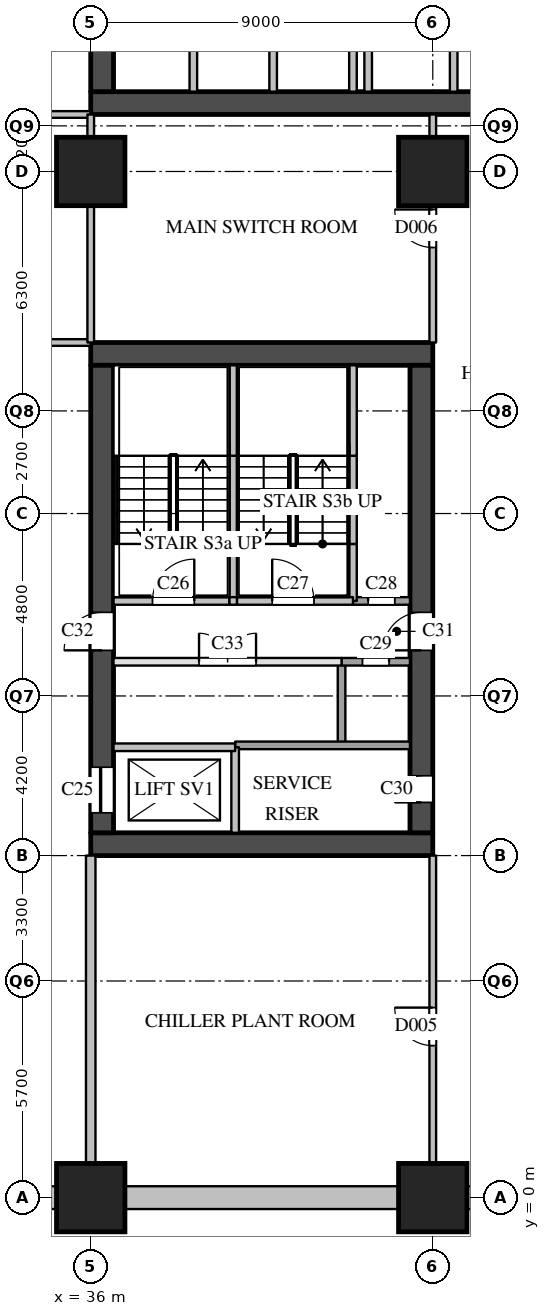
"""IFC4 building model, lengths in metres.
Left out: names, types, materials, properties, quantities, classifications, styles, units other than length and angle.
Written with IfcOpenShell. Run it as: python <this file> out.ifc"""

import sys

from ifc_helpers import new_model, si_unit, direction, frame, frame_2d, origin, origin_2d, place, context, subcontext, project, spatial, rectangle, extrude, element, fill, save


model = new_model("IFC4")
c1 = context("Model", 3, precision=1e-05, world=origin(), true_north=direction((0.0, 1.0)))
c2 = subcontext(c1, "Body", "Model", "MODEL_VIEW")
j1 = project(units=[si_unit("LENGTHUNIT", "METRE"), si_unit("PLANEANGLEUNIT", "RADIAN")], contexts=[c1])
p1 = place(None, origin())
s1 = spatial("IfcSite", under=j1, at=p1, CompositionType="ELEMENT")
p2 = place(p1, origin())
s2 = spatial("IfcBuilding", under=s1, at=p2, CompositionType="ELEMENT")
p3 = place(p2, frame((0.0, 0.0, -6.0)))
s3 = spatial("IfcBuildingStorey", under=s2, at=p3, CompositionType="ELEMENT", Elevation=-6.0)
for number, where, z_axis, x_axis in (
    (1, (36.0, 0.0, 0.0), (0.0, 0.0, 1.0), (1.0, 0.0, 0.0)),
    (2, (36.0, 27.0, 0.0), (0.0, 0.0, 1.0), (1.0, 0.0, 0.0)),
    (3, (45.0, 0.0, 0.0), (0.0, 0.0, 1.0), (1.0, 0.0, 0.0)),
    (4, (45.0, 27.0, 0.0), (0.0, 0.0, 1.0), (1.0, 0.0, 0.0)),
):
    element("IfcColumn", number, at=place(p3, frame(where, z_axis=z_axis, x_axis=x_axis)), inside=s3, PredefinedType="COLUMN", context=c2, shape_type="SweptSolid", body=[
        extrude(rectangle(XDim=1.8, YDim=1.8, at=origin_2d()), origin(), (0.0, 0.0, 1.0), 6.0),
    ])
for number, where, z_axis, x_axis in (
    (5, (27.9, 0.0, 0.0), (0.0, 0.0, 1.0), (1.0, 0.0, 0.0)),
    (6, (36.9, 0.0, 0.0), (0.0, 0.0, 1.0), (1.0, 0.0, 0.0)),
):
    element("IfcWall", number, at=place(p3, frame(where, z_axis=z_axis, x_axis=x_axis)), inside=s3, PredefinedType="SOLIDWALL", context=c2, shape_type="SweptSolid", body=[
        extrude(rectangle(XDim=7.2, YDim=0.6, at=frame_2d((3.6, 0.0))), origin(), (0.0, 0.0, 1.0), 5.59),
    ])
p4 = place(p3, frame((45.9, 0.0, 0.0), z_axis=(0.0, 0.0, 1.0), x_axis=(1.0, 0.0, 0.0)))
e7 = element("IfcWall", 7, at=p4, inside=s3, PredefinedType="SOLIDWALL", context=c2, shape_type="SweptSolid", body=[
    extrude(rectangle(XDim=3.6, YDim=0.6, at=frame_2d((1.8, 0.0))), origin(), (0.0, 0.0, 1.0), 5.59),
])
p5 = place(p3, frame((36.0, 28.8, 0.0), z_axis=(0.0, 0.0, 1.0), x_axis=(1.0, 0.0, 0.0)))
e8 = element("IfcWall", 8, at=p5, inside=s3, PredefinedType="SHEAR", context=c2, shape_type="SweptSolid", body=[
    extrude(rectangle(XDim=12.4, YDim=0.6, at=frame_2d((6.2, 0.0))), origin(), (0.0, 0.0, 1.0), 5.59),
])
p6 = place(p3, frame((36.3, 29.1, 0.0), z_axis=(0.0, 0.0, 1.0), x_axis=(0.0, 1.0, 0.0)))
e9 = element("IfcWall", 9, at=p6, inside=s3, PredefinedType="SHEAR", context=c2, shape_type="SweptSolid", body=[
    extrude(rectangle(XDim=20.3, YDim=0.6, at=frame_2d((10.15, 0.0))), origin(), (0.0, 0.0, 1.0), 5.59),
])
p7 = place(p6, frame((16.4, 0.0, 0.0)))
e10 = element("IfcOpeningElement", 10, at=p7, cuts=e9, PredefinedType="OPENING", context=c2, shape_type="SweptSolid", body=[
    extrude(rectangle(XDim=1.0, YDim=2.1, at=frame_2d((0.5, 1.05))), frame((0.0, 0.31, 0.0), z_axis=(0.0, -1.0, 0.0), x_axis=(1.0, 0.0, 0.0)), (0.0, 0.0, 1.0), 0.62),
])
for number, where, z_axis, x_axis in (
    (11, (38.7, 29.1, 0.0), (0.0, 0.0, 1.0), (0.0, 1.0, 0.0)),
    (12, (40.8, 29.1, 0.0), (0.0, 0.0, 1.0), (0.0, 1.0, 0.0)),
    (13, (42.9, 29.1, 0.0), (0.0, 0.0, 1.0), (0.0, 1.0, 0.0)),
    (14, (43.3, 29.1, 0.0), (0.0, 0.0, 1.0), (0.0, 1.0, 0.0)),
    (15, (45.55, 29.1, 0.0), (0.0, 0.0, 1.0), (0.0, 1.0, 0.0)),
):
    element("IfcWall", number, at=place(p3, frame(where, z_axis=z_axis, x_axis=x_axis)), inside=s3, PredefinedType="SOLIDWALL", context=c2, shape_type="SweptSolid", body=[
        extrude(rectangle(XDim=3.2, YDim=0.2, at=frame_2d((1.6, 0.0))), origin(), (0.0, 0.0, 1.0), 5.59),
    ])
for number, where, z_axis, x_axis in (
    (16, (36.0, 9.3, 0.0), (0.0, 0.0, 1.0), (1.0, 0.0, 0.0)),
    (17, (36.0, 22.2, 0.0), (0.0, 0.0, 1.0), (1.0, 0.0, 0.0)),
):
    element("IfcWall", number, at=place(p3, frame(where, z_axis=z_axis, x_axis=x_axis)), inside=s3, PredefinedType="SHEAR", context=c2, shape_type="SweptSolid", body=[
        extrude(rectangle(XDim=9.0, YDim=0.6, at=frame_2d((4.5, 0.0))), origin(), (0.0, 0.0, 1.0), 5.59),
    ])
p8 = place(p3, frame((36.3, 9.6, 0.0), z_axis=(0.0, 0.0, 1.0), x_axis=(0.0, 1.0, 0.0)))
e18 = element("IfcWall", 18, at=p8, inside=s3, PredefinedType="SHEAR", context=c2, shape_type="SweptSolid", body=[
    extrude(rectangle(XDim=12.3, YDim=0.6, at=frame_2d((6.15, 0.0))), origin(), (0.0, 0.0, 1.0), 5.59),
])
p9 = place(p8, frame((0.525, 0.0, 0.0)))
e19 = element("IfcOpeningElement", 19, at=p9, cuts=e18, PredefinedType="OPENING", context=c2, shape_type="SweptSolid", body=[
    extrude(rectangle(XDim=1.2, YDim=2.1, at=frame_2d((0.6, 1.05))), frame((0.0, 0.31, 0.0), z_axis=(0.0, -1.0, 0.0), x_axis=(1.0, 0.0, 0.0)), (0.0, 0.0, 1.0), 0.62),
])
p10 = place(p8, frame((4.8, 0.0, 0.0)))
e20 = element("IfcOpeningElement", 20, at=p10, cuts=e18, PredefinedType="OPENING", context=c2, shape_type="SweptSolid", body=[
    extrude(rectangle(XDim=1.0, YDim=2.1, at=frame_2d((0.5, 1.05))), frame((0.0, 0.31, 0.0), z_axis=(0.0, -1.0, 0.0), x_axis=(1.0, 0.0, 0.0)), (0.0, 0.0, 1.0), 0.62),
])
p11 = place(p3, frame((44.7, 9.6, 0.0), z_axis=(0.0, 0.0, 1.0), x_axis=(0.0, 1.0, 0.0)))
e21 = element("IfcWall", 21, at=p11, inside=s3, PredefinedType="SHEAR", context=c2, shape_type="SweptSolid", body=[
    extrude(rectangle(XDim=12.3, YDim=0.6, at=frame_2d((6.15, 0.0))), origin(), (0.0, 0.0, 1.0), 5.59),
])
p12 = place(p11, frame((0.8, 0.0, 0.0)))
e22 = element("IfcOpeningElement", 22, at=p12, cuts=e21, PredefinedType="OPENING", context=c2, shape_type="SweptSolid", body=[
    extrude(rectangle(XDim=0.7, YDim=2.1, at=frame_2d((0.35, 1.05))), frame((0.0, 0.31, 0.0), z_axis=(0.0, -1.0, 0.0), x_axis=(1.0, 0.0, 0.0)), (0.0, 0.0, 1.0), 0.62),
])
p13 = place(p11, frame((4.8, 0.0, 0.0)))
e23 = element("IfcOpeningElement", 23, at=p13, cuts=e21, PredefinedType="OPENING", context=c2, shape_type="SweptSolid", body=[
    extrude(rectangle(XDim=1.0, YDim=2.1, at=frame_2d((0.5, 1.05))), frame((0.0, 0.31, 0.0), z_axis=(0.0, -1.0, 0.0), x_axis=(1.0, 0.0, 0.0)), (0.0, 0.0, 1.0), 0.62),
])
p14 = place(p3, frame((39.75, 15.7, 0.0), z_axis=(0.0, 0.0, 1.0), x_axis=(0.0, 1.0, 0.0)))
e24 = element("IfcWall", 24, at=p14, inside=s3, PredefinedType="SOLIDWALL", context=c2, shape_type="SweptSolid", body=[
    extrude(rectangle(XDim=1.5, YDim=0.2, at=frame_2d((0.75, 0.0))), origin(), (0.0, 0.0, 1.0), 5.59),
])
p15 = place(p3, frame((39.75, 17.2, 0.0), z_axis=(0.0, 0.0, 1.0), x_axis=(0.0, 1.0, 0.0)))
e25 = element("IfcWall", 25, at=p15, inside=s3, PredefinedType="SOLIDWALL", context=c2, shape_type="SweptSolid", body=[
    extrude(rectangle(XDim=2.32, YDim=0.2, at=frame_2d((1.16, 0.0))), origin(), (0.0, 0.0, 1.0), 5.59),
])
p16 = place(p3, frame((39.75, 19.52, 0.0), z_axis=(0.0, 0.0, 1.0), x_axis=(0.0, 1.0, 0.0)))
e26 = element("IfcWall", 26, at=p16, inside=s3, PredefinedType="SOLIDWALL", context=c2, shape_type="SweptSolid", body=[
    extrude(rectangle(XDim=2.38, YDim=0.2, at=frame_2d((1.19, 0.0))), origin(), (0.0, 0.0, 1.0), 5.59),
])
p17 = place(p3, frame((39.8, 9.6, 0.0), z_axis=(0.0, 0.0, 1.0), x_axis=(0.0, 1.0, 0.0)))
e27 = element("IfcWall", 27, at=p17, inside=s3, PredefinedType="SOLIDWALL", context=c2, shape_type="SweptSolid", body=[
    extrude(rectangle(XDim=2.25, YDim=0.2, at=frame_2d((1.125, 0.0))), origin(), (0.0, 0.0, 1.0), 5.59),
])
p18 = place(p3, frame((39.8, 11.85, 0.0), z_axis=(0.0, 0.0, 1.0), x_axis=(0.0, 1.0, 0.0)))
e28 = element("IfcWall", 28, at=p18, inside=s3, PredefinedType="SOLIDWALL", context=c2, shape_type="SweptSolid", body=[
    extrude(rectangle(XDim=0.05, YDim=0.2, at=frame_2d((0.025, 0.0))), origin(), (0.0, 0.0, 1.0), 5.59),
])
p19 = place(p3, frame((42.6, 11.9, 0.0), z_axis=(0.0, 0.0, 1.0), x_axis=(0.0, 1.0, 0.0)))
e29 = element("IfcWall", 29, at=p19, inside=s3, PredefinedType="SOLIDWALL", context=c2, shape_type="SweptSolid", body=[
    extrude(rectangle(XDim=2.2, YDim=0.2, at=frame_2d((1.1, 0.0))), origin(), (0.0, 0.0, 1.0), 5.59),
])
p20 = place(p3, frame((42.9, 15.7, 0.0), z_axis=(0.0, 0.0, 1.0), x_axis=(0.0, 1.0, 0.0)))
e30 = element("IfcWall", 30, at=p20, inside=s3, PredefinedType="SOLIDWALL", context=c2, shape_type="SweptSolid", body=[
    extrude(rectangle(XDim=1.5, YDim=0.2, at=frame_2d((0.75, 0.0))), origin(), (0.0, 0.0, 1.0), 5.59),
])
p21 = place(p3, frame((42.9, 17.2, 0.0), z_axis=(0.0, 0.0, 1.0), x_axis=(0.0, 1.0, 0.0)))
e31 = element("IfcWall", 31, at=p21, inside=s3, PredefinedType="SOLIDWALL", context=c2, shape_type="SweptSolid", body=[
    extrude(rectangle(XDim=2.32, YDim=0.2, at=frame_2d((1.16, 0.0))), origin(), (0.0, 0.0, 1.0), 5.59),
])
p22 = place(p3, frame((42.9, 19.52, 0.0), z_axis=(0.0, 0.0, 1.0), x_axis=(0.0, 1.0, 0.0)))
e32 = element("IfcWall", 32, at=p22, inside=s3, PredefinedType="SOLIDWALL", context=c2, shape_type="SweptSolid", body=[
    extrude(rectangle(XDim=2.38, YDim=0.2, at=frame_2d((1.19, 0.0))), origin(), (0.0, 0.0, 1.0), 5.59),
])
p23 = place(p3, frame((36.6, 11.85, 0.0), z_axis=(0.0, 0.0, 1.0), x_axis=(1.0, 0.0, 0.0)))
e33 = element("IfcWall", 33, at=p23, inside=s3, PredefinedType="SOLIDWALL", context=c2, shape_type="SweptSolid", body=[
    extrude(rectangle(XDim=3.2, YDim=0.2, at=frame_2d((1.6, 0.0))), origin(), (0.0, 0.0, 1.0), 5.59),
])
p24 = place(p3, frame((39.8, 11.9, 0.0), z_axis=(0.0, 0.0, 1.0), x_axis=(1.0, 0.0, 0.0)))
e34 = element("IfcWall", 34, at=p24, inside=s3, PredefinedType="SOLIDWALL", context=c2, shape_type="SweptSolid", body=[
    extrude(rectangle(XDim=4.6, YDim=0.2, at=frame_2d((2.3, 0.0))), origin(), (0.0, 0.0, 1.0), 5.59),
])
p25 = place(p3, frame((36.6, 14.1, 0.0), z_axis=(0.0, 0.0, 1.0), x_axis=(1.0, 0.0, 0.0)))
e35 = element("IfcWall", 35, at=p25, inside=s3, PredefinedType="PARTITIONING", context=c2, shape_type="SweptSolid", body=[
    extrude(rectangle(XDim=6.0, YDim=0.2, at=frame_2d((3.0, 0.0))), origin(), (0.0, 0.0, 1.0), 5.59),
])
p26 = place(p25, frame((2.25, 0.0, 0.0)))
e36 = element("IfcOpeningElement", 36, at=p26, cuts=e35, PredefinedType="OPENING", context=c2, shape_type="SweptSolid", body=[
    extrude(rectangle(XDim=1.5, YDim=2.1, at=frame_2d((0.75, 1.05))), frame((0.0, 0.11, 0.0), z_axis=(0.0, -1.0, 0.0), x_axis=(1.0, 0.0, 0.0)), (0.0, 0.0, 1.0), 0.22),
])
p27 = place(p3, frame((42.6, 14.1, 0.0), z_axis=(0.0, 0.0, 1.0), x_axis=(1.0, 0.0, 0.0)))
e37 = element("IfcWall", 37, at=p27, inside=s3, PredefinedType="SOLIDWALL", context=c2, shape_type="SweptSolid", body=[
    extrude(rectangle(XDim=1.8, YDim=0.2, at=frame_2d((0.9, 0.0))), origin(), (0.0, 0.0, 1.0), 5.59),
])
p28 = place(p27, frame((0.55, 0.0, 0.0)))
e38 = element("IfcOpeningElement", 38, at=p28, cuts=e37, PredefinedType="OPENING", context=c2, shape_type="SweptSolid", body=[
    extrude(rectangle(XDim=0.7, YDim=2.1, at=frame_2d((0.35, 1.05))), frame((0.0, 0.11, 0.0), z_axis=(0.0, -1.0, 0.0), x_axis=(1.0, 0.0, 0.0)), (0.0, 0.0, 1.0), 0.22),
])
p29 = place(p3, frame((42.9, 15.7, 0.0), z_axis=(0.0, 0.0, 1.0), x_axis=(1.0, 0.0, 0.0)))
e39 = element("IfcWall", 39, at=p29, inside=s3, PredefinedType="SOLIDWALL", context=c2, shape_type="SweptSolid", body=[
    extrude(rectangle(XDim=1.5, YDim=0.2, at=frame_2d((0.75, 0.0))), origin(), (0.0, 0.0, 1.0), 5.59),
])
p30 = place(p29, frame((0.4, 0.0, 0.0)))
e40 = element("IfcOpeningElement", 40, at=p30, cuts=e39, PredefinedType="OPENING", context=c2, shape_type="SweptSolid", body=[
    extrude(rectangle(XDim=0.7, YDim=2.1, at=frame_2d((0.35, 1.05))), frame((0.0, 0.11, 0.0), z_axis=(0.0, -1.0, 0.0), x_axis=(1.0, 0.0, 0.0)), (0.0, 0.0, 1.0), 0.22),
])
p31 = place(p3, frame((36.6, 15.7, 0.0), z_axis=(0.0, 0.0, 1.0), x_axis=(1.0, 0.0, 0.0)))
e41 = element("IfcWall", 41, at=p31, inside=s3, PredefinedType="SOLIDWALL", context=c2, shape_type="SweptSolid", body=[
    extrude(rectangle(XDim=3.05, YDim=0.2, at=frame_2d((1.525, 0.0))), origin(), (0.0, 0.0, 1.0), 5.59),
])
p32 = place(p31, frame((1.025, 0.0, 0.0)))
e42 = element("IfcOpeningElement", 42, at=p32, cuts=e41, PredefinedType="OPENING", context=c2, shape_type="SweptSolid", body=[
    extrude(rectangle(XDim=1.1, YDim=2.1, at=frame_2d((0.55, 1.05))), frame((0.0, 0.11, 0.0), z_axis=(0.0, -1.0, 0.0), x_axis=(1.0, 0.0, 0.0)), (0.0, 0.0, 1.0), 0.22),
])
p33 = place(p3, frame((39.65, 15.7, 0.0), z_axis=(0.0, 0.0, 1.0), x_axis=(1.0, 0.0, 0.0)))
e43 = element("IfcWall", 43, at=p33, inside=s3, PredefinedType="SOLIDWALL", context=c2, shape_type="SweptSolid", body=[
    extrude(rectangle(XDim=0.2, YDim=0.2, at=frame_2d((0.1, 0.0))), origin(), (0.0, 0.0, 1.0), 5.59),
])
p34 = place(p3, frame((39.85, 15.7, 0.0), z_axis=(0.0, 0.0, 1.0), x_axis=(1.0, 0.0, 0.0)))
e44 = element("IfcWall", 44, at=p34, inside=s3, PredefinedType="SOLIDWALL", context=c2, shape_type="SweptSolid", body=[
    extrude(rectangle(XDim=3.05, YDim=0.2, at=frame_2d((1.525, 0.0))), origin(), (0.0, 0.0, 1.0), 5.59),
])
p35 = place(p34, frame((0.925, 0.0, 0.0)))
e45 = element("IfcOpeningElement", 45, at=p35, cuts=e44, PredefinedType="OPENING", context=c2, shape_type="SweptSolid", body=[
    extrude(rectangle(XDim=1.1, YDim=2.1, at=frame_2d((0.55, 1.05))), frame((0.0, 0.11, 0.0), z_axis=(0.0, -1.0, 0.0), x_axis=(1.0, 0.0, 0.0)), (0.0, 0.0, 1.0), 0.22),
])
for number, where, z_axis, x_axis in (
    (46, (21.0, 22.5, 0.0), (0.0, 0.0, 1.0), (1.0, 0.0, 0.0)),
    (47, (21.0, 28.5, 0.0), (0.0, 0.0, 1.0), (1.0, 0.0, 0.0)),
):
    element("IfcWall", number, at=place(p3, frame(where, z_axis=z_axis, x_axis=x_axis)), inside=s3, PredefinedType="PARTITIONING", context=c2, shape_type="SweptSolid", body=[
        extrude(rectangle(XDim=15.0, YDim=0.175, at=frame_2d((7.5, 0.0))), origin(), (0.0, 0.0, 1.0), 5.59),
    ])
p36 = place(p3, frame((36.0, 22.5, 0.0), z_axis=(0.0, 0.0, 1.0), x_axis=(0.0, 1.0, 0.0)))
e48 = element("IfcWall", 48, at=p36, inside=s3, PredefinedType="PARTITIONING", context=c2, shape_type="SweptSolid", body=[
    extrude(rectangle(XDim=6.0, YDim=0.175, at=frame_2d((3.0, 0.0))), origin(), (0.0, 0.0, 1.0), 5.59),
])
p37 = place(p3, frame((45.0, 0.0, 0.0), z_axis=(0.0, 0.0, 1.0), x_axis=(0.0, 1.0, 0.0)))
e49 = element("IfcWall", 49, at=p37, inside=s3, PredefinedType="PARTITIONING", context=c2, shape_type="SweptSolid", body=[
    extrude(rectangle(XDim=9.0, YDim=0.175, at=frame_2d((4.5, 0.0))), origin(), (0.0, 0.0, 1.0), 5.59),
])
p38 = place(p37, frame((4.0, 0.0, 0.0)))
e50 = element("IfcOpeningElement", 50, at=p38, cuts=e49, PredefinedType="OPENING", context=c2, shape_type="SweptSolid", body=[
    extrude(rectangle(XDim=1.0, YDim=2.1, at=frame_2d((0.5, 1.05))), frame((0.0, 0.097, 0.0), z_axis=(0.0, -1.0, 0.0), x_axis=(1.0, 0.0, 0.0)), (0.0, 0.0, 1.0), 0.195),
])
p39 = place(p3, frame((45.0, 22.5, 0.0), z_axis=(0.0, 0.0, 1.0), x_axis=(0.0, 1.0, 0.0)))
e51 = element("IfcWall", 51, at=p39, inside=s3, PredefinedType="PARTITIONING", context=c2, shape_type="SweptSolid", body=[
    extrude(rectangle(XDim=6.0, YDim=0.175, at=frame_2d((3.0, 0.0))), origin(), (0.0, 0.0, 1.0), 5.59),
])
p40 = place(p39, frame((2.5, 0.0, 0.0)))
e52 = element("IfcOpeningElement", 52, at=p40, cuts=e51, PredefinedType="OPENING", context=c2, shape_type="SweptSolid", body=[
    extrude(rectangle(XDim=1.0, YDim=2.1, at=frame_2d((0.5, 1.05))), frame((0.0, 0.097, 0.0), z_axis=(0.0, -1.0, 0.0), x_axis=(1.0, 0.0, 0.0)), (0.0, 0.0, 1.0), 0.195),
])
p41 = place(p3, frame((36.0, 0.0, 0.0), z_axis=(0.0, 0.0, 1.0), x_axis=(0.0, 1.0, 0.0)))
e53 = element("IfcWall", 53, at=p41, inside=s3, PredefinedType="PARTITIONING", context=c2, shape_type="SweptSolid", body=[
    extrude(rectangle(XDim=9.0, YDim=0.25, at=frame_2d((4.5, 0.0))), origin(), (0.0, 0.0, 1.0), 5.59),
])
p42 = place(p9, origin())
e54 = element("IfcDoor", 54, at=p42, inside=s3, OperationType="SLIDING_TO_LEFT", PredefinedType="DOOR", context=c2, shape_type="SweptSolid", body=[
    extrude(rectangle(XDim=1.2, YDim=2.1, at=frame_2d((0.6, 1.05))), frame((0.0, 0.025, 0.0), z_axis=(0.0, -1.0, 0.0), x_axis=(1.0, 0.0, 0.0)), (0.0, 0.0, 1.0), 0.05),
])
fill(e19, e54)
p43 = place(p32, origin())
e55 = element("IfcDoor", 55, at=p43, inside=s3, OperationType="SINGLE_SWING_RIGHT", PredefinedType="DOOR", context=c2, shape_type="SweptSolid", body=[
    extrude(rectangle(XDim=1.1, YDim=2.1, at=frame_2d((0.55, 1.05))), frame((0.0, 0.025, 0.0), z_axis=(0.0, -1.0, 0.0), x_axis=(1.0, 0.0, 0.0)), (0.0, 0.0, 1.0), 0.05),
])
fill(e42, e55)
p44 = place(p35, origin())
e56 = element("IfcDoor", 56, at=p44, inside=s3, OperationType="SINGLE_SWING_LEFT", PredefinedType="DOOR", context=c2, shape_type="SweptSolid", body=[
    extrude(rectangle(XDim=1.1, YDim=2.1, at=frame_2d((0.55, 1.05))), frame((0.0, 0.025, 0.0), z_axis=(0.0, -1.0, 0.0), x_axis=(1.0, 0.0, 0.0)), (0.0, 0.0, 1.0), 0.05),
])
fill(e45, e56)
p45 = place(p30, origin())
e57 = element("IfcDoor", 57, at=p45, inside=s3, OperationType="SINGLE_SWING_LEFT", PredefinedType="DOOR", context=c2, shape_type="SweptSolid", body=[
    extrude(rectangle(XDim=0.7, YDim=2.1, at=frame_2d((0.35, 1.05))), frame((0.0, 0.025, 0.0), z_axis=(0.0, -1.0, 0.0), x_axis=(1.0, 0.0, 0.0)), (0.0, 0.0, 1.0), 0.05),
])
fill(e40, e57)
p46 = place(p28, origin())
e58 = element("IfcDoor", 58, at=p46, inside=s3, OperationType="SINGLE_SWING_RIGHT", PredefinedType="DOOR", context=c2, shape_type="SweptSolid", body=[
    extrude(rectangle(XDim=0.7, YDim=2.1, at=frame_2d((0.35, 1.05))), frame((0.0, 0.025, 0.0), z_axis=(0.0, -1.0, 0.0), x_axis=(1.0, 0.0, 0.0)), (0.0, 0.0, 1.0), 0.05),
])
fill(e38, e58)
p47 = place(p12, origin())
e59 = element("IfcDoor", 59, at=p47, inside=s3, OperationType="SINGLE_SWING_LEFT", PredefinedType="DOOR", context=c2, shape_type="SweptSolid", body=[
    extrude(rectangle(XDim=0.7, YDim=2.1, at=frame_2d((0.35, 1.05))), frame((0.0, 0.025, 0.0), z_axis=(0.0, -1.0, 0.0), x_axis=(1.0, 0.0, 0.0)), (0.0, 0.0, 1.0), 0.05),
])
fill(e22, e59)
p48 = place(p13, origin())
e60 = element("IfcDoor", 60, at=p48, inside=s3, OperationType="SINGLE_SWING_LEFT", PredefinedType="DOOR", context=c2, shape_type="SweptSolid", body=[
    extrude(rectangle(XDim=1.0, YDim=2.1, at=frame_2d((0.5, 1.05))), frame((0.0, 0.025, 0.0), z_axis=(0.0, -1.0, 0.0), x_axis=(1.0, 0.0, 0.0)), (0.0, 0.0, 1.0), 0.05),
])
fill(e23, e60)
p49 = place(p10, origin())
e61 = element("IfcDoor", 61, at=p49, inside=s3, OperationType="SINGLE_SWING_LEFT", PredefinedType="DOOR", context=c2, shape_type="SweptSolid", body=[
    extrude(rectangle(XDim=1.0, YDim=2.1, at=frame_2d((0.5, 1.05))), frame((0.0, 0.025, 0.0), z_axis=(0.0, -1.0, 0.0), x_axis=(1.0, 0.0, 0.0)), (0.0, 0.0, 1.0), 0.05),
])
fill(e20, e61)
p50 = place(p26, origin())
e62 = element("IfcDoor", 62, at=p50, inside=s3, OperationType="DOUBLE_DOOR_SINGLE_SWING", PredefinedType="DOOR", context=c2, shape_type="SweptSolid", body=[
    extrude(rectangle(XDim=1.5, YDim=2.1, at=frame_2d((0.75, 1.05))), frame((0.0, 0.025, 0.0), z_axis=(0.0, -1.0, 0.0), x_axis=(1.0, 0.0, 0.0)), (0.0, 0.0, 1.0), 0.05),
])
fill(e36, e62)
p51 = place(p38, origin())
e63 = element("IfcDoor", 63, at=p51, inside=s3, OperationType="SINGLE_SWING_RIGHT", PredefinedType="DOOR", context=c2, shape_type="SweptSolid", body=[
    extrude(rectangle(XDim=1.0, YDim=2.1, at=frame_2d((0.5, 1.05))), frame((0.0, 0.025, 0.0), z_axis=(0.0, -1.0, 0.0), x_axis=(1.0, 0.0, 0.0)), (0.0, 0.0, 1.0), 0.05),
])
fill(e50, e63)
p52 = place(p40, origin())
e64 = element("IfcDoor", 64, at=p52, inside=s3, OperationType="SINGLE_SWING_RIGHT", PredefinedType="DOOR", context=c2, shape_type="SweptSolid", body=[
    extrude(rectangle(XDim=1.0, YDim=2.1, at=frame_2d((0.5, 1.05))), frame((0.0, 0.025, 0.0), z_axis=(0.0, -1.0, 0.0), x_axis=(1.0, 0.0, 0.0)), (0.0, 0.0, 1.0), 0.05),
])
fill(e52, e64)
save(model, sys.argv[1])
